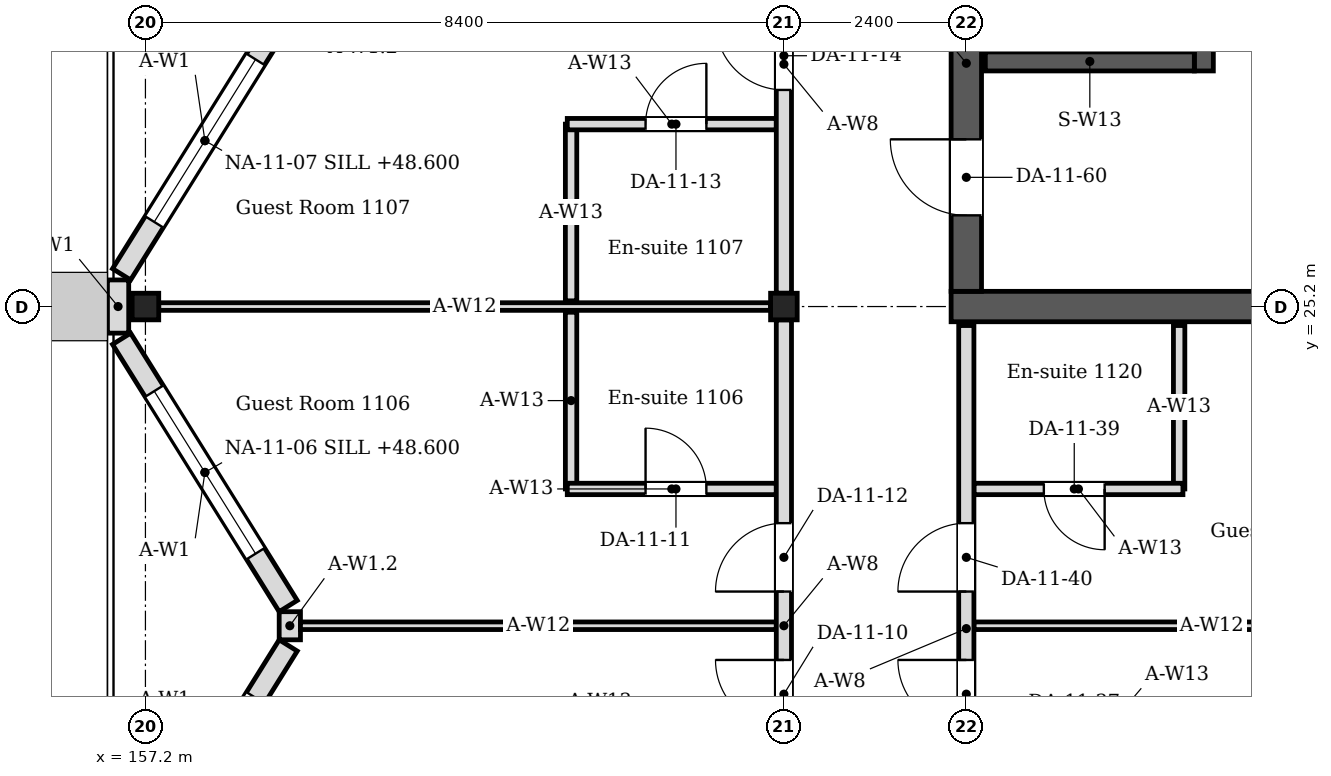
"""IFC4 building model, lengths in metres.
Left out: names, types, materials, properties, quantities, classifications, styles, units other than length and angle.
Written with IfcOpenShell. Run it as: python <this file> out.ifc"""

import sys

from ifc_helpers import new_model, si_unit, direction, frame, frame_2d, origin, origin_2d, place, context, subcontext, project, spatial, rectangle, i_section, extrude, element, fill, save


model = new_model("IFC4")
c1 = context("Model", 3, precision=1e-05, world=origin(), true_north=direction((0.0, 1.0)))
c2 = subcontext(c1, "Body", "Model", "MODEL_VIEW")
j1 = project(units=[si_unit("LENGTHUNIT", "METRE"), si_unit("PLANEANGLEUNIT", "RADIAN")], contexts=[c1])
p1 = place(None, origin())
s1 = spatial("IfcSite", under=j1, at=p1, CompositionType="ELEMENT")
p2 = place(p1, origin())
s2 = spatial("IfcBuilding", under=s1, at=p2, CompositionType="ELEMENT")
p3 = place(p2, frame((0.0, 0.0, 48.0)))
s3 = spatial("IfcBuildingStorey", under=s2, at=p3, CompositionType="ELEMENT", Elevation=48.0)
for number, where, z_axis, x_axis in (
    (1, (157.2, 25.2, 0.0), (0.0, 0.0, 1.0), (1.0, 0.0, 0.0)),
    (2, (165.6, 25.2, 0.0), (0.0, 0.0, 1.0), (1.0, 0.0, 0.0)),
):
    element("IfcColumn", number, at=place(p3, frame(where, z_axis=z_axis, x_axis=x_axis)), inside=s3, PredefinedType="COLUMN", context=c2, shape_type="SweptSolid", body=[
        extrude(i_section(OverallWidth=0.35, OverallDepth=0.35, WebThickness=0.012, FlangeThickness=0.019, FilletRadius=0.013, at=origin_2d()), origin(), (0.0, 0.0, 1.0), 4.2),
    ])
p4 = place(p3, frame((167.8, 25.2, 0.0), z_axis=(0.0, 0.0, 1.0), x_axis=(1.0, 0.0, 0.0)))
e3 = element("IfcWall", 3, at=p4, inside=s3, PredefinedType="SOLIDWALL", context=c2, shape_type="SweptSolid", body=[
    extrude(rectangle(XDim=8.8, YDim=0.4, at=frame_2d((4.4, 0.0))), origin(), (0.0, 0.0, 1.0), 4.05),
])
p5 = place(p3, frame((168.0, 25.4, 0.0), z_axis=(0.0, 0.0, 1.0), x_axis=(0.0, 1.0, 0.0)))
e4 = element("IfcWall", 4, at=p5, inside=s3, PredefinedType="SOLIDWALL", context=c2, shape_type="SweptSolid", body=[
    extrude(rectangle(XDim=16.4, YDim=0.4, at=frame_2d((8.2, 0.0))), origin(), (0.0, 0.0, 1.0), 4.05),
])
p6 = place(p5, frame((1.0, 0.0, 0.0)))
e5 = element("IfcOpeningElement", 5, at=p6, cuts=e4, PredefinedType="OPENING", context=c2, shape_type="SweptSolid", body=[
    extrude(rectangle(XDim=1.0, YDim=2.1, at=frame_2d((0.5, 1.05))), frame((0.0, 0.21, 0.0), z_axis=(0.0, -1.0, 0.0), x_axis=(1.0, 0.0, 0.0)), (0.0, 0.0, 1.0), 0.42),
])
p7 = place(p5, frame((14.4, 0.0, 0.0)))
e6 = element("IfcOpeningElement", 6, at=p7, cuts=e4, PredefinedType="OPENING", context=c2, shape_type="SweptSolid", body=[
    extrude(rectangle(XDim=1.4, YDim=2.1, at=frame_2d((0.7, 1.05))), frame((0.0, 0.21, 0.0), z_axis=(0.0, -1.0, 0.0), x_axis=(1.0, 0.0, 0.0)), (0.0, 0.0, 1.0), 0.42),
])
p8 = place(p3, frame((156.886, 17.224, 0.0), z_axis=(0.0, 0.0, 1.0), x_axis=(0.529018946142, 0.848610013271, 0.0)))
e7 = element("IfcWall", 7, at=p8, inside=s3, PredefinedType="SOLIDWALL", context=c2, shape_type="SweptSolid", body=[
    extrude(rectangle(XDim=4.144, YDim=0.28, at=frame_2d((2.072, 0.0))), origin(), (0.0, 0.0, 1.0), 4.05),
])
p9 = place(p8, frame((0.812, 0.0, 0.6)))
e8 = element("IfcOpeningElement", 8, at=p9, cuts=e7, PredefinedType="OPENING", context=c2, shape_type="SweptSolid", body=[
    extrude(rectangle(XDim=2.52, YDim=2.4, at=frame_2d((1.26, 1.2))), frame((0.0, 0.15, 0.0), z_axis=(0.0, -1.0, 0.0), x_axis=(1.0, 0.0, 0.0)), (0.0, 0.0, 1.0), 0.3),
])
p10 = place(p3, frame((159.079, 21.259, 0.0), z_axis=(0.0, 0.0, 1.0), x_axis=(-0.529018946142, 0.848610013271, 0.0)))
e9 = element("IfcWall", 9, at=p10, inside=s3, PredefinedType="SOLIDWALL", context=c2, shape_type="SweptSolid", body=[
    extrude(rectangle(XDim=4.144, YDim=0.28, at=frame_2d((2.072, 0.0))), origin(), (0.0, 0.0, 1.0), 4.05),
])
p11 = place(p10, frame((0.812, 0.0, 0.6)))
e10 = element("IfcOpeningElement", 10, at=p11, cuts=e9, PredefinedType="OPENING", context=c2, shape_type="SweptSolid", body=[
    extrude(rectangle(XDim=2.52, YDim=2.4, at=frame_2d((1.26, 1.2))), frame((0.0, 0.15, 0.0), z_axis=(0.0, -1.0, 0.0), x_axis=(1.0, 0.0, 0.0)), (0.0, 0.0, 1.0), 0.3),
])
p12 = place(p3, frame((159.1, 20.815, 0.0), z_axis=(0.0, 0.0, 1.0), x_axis=(0.0, 1.0, 0.0)))
e11 = element("IfcWall", 11, at=p12, inside=s3, PredefinedType="SOLIDWALL", context=c2, shape_type="SweptSolid", body=[
    extrude(rectangle(XDim=0.37, YDim=0.28, at=frame_2d((0.185, 0.0))), origin(), (0.0, 0.0, 1.0), 3.604),
])
p13 = place(p3, frame((156.84, 24.85, 0.0), z_axis=(0.0, 0.0, 1.0), x_axis=(0.0, 1.0, 0.0)))
e12 = element("IfcWall", 12, at=p13, inside=s3, PredefinedType="SOLIDWALL", context=c2, shape_type="SweptSolid", body=[
    extrude(rectangle(XDim=0.7, YDim=0.28, at=frame_2d((0.35, 0.0))), origin(), (0.0, 0.0, 1.0), 4.05),
])
p14 = place(p3, frame((156.886, 25.624, 0.0), z_axis=(0.0, 0.0, 1.0), x_axis=(0.528992500338, 0.848626498871, 0.0)))
e13 = element("IfcWall", 13, at=p14, inside=s3, PredefinedType="SOLIDWALL", context=c2, shape_type="SweptSolid", body=[
    extrude(rectangle(XDim=4.145, YDim=0.28, at=frame_2d((2.072, 0.0))), origin(), (0.0, 0.0, 1.0), 4.05),
])
p15 = place(p14, frame((0.812, 0.0, 0.6)))
e14 = element("IfcOpeningElement", 14, at=p15, cuts=e13, PredefinedType="OPENING", context=c2, shape_type="SweptSolid", body=[
    extrude(rectangle(XDim=2.52, YDim=2.4, at=frame_2d((1.26, 1.2))), frame((0.0, 0.15, 0.0), z_axis=(0.0, -1.0, 0.0), x_axis=(1.0, 0.0, 0.0)), (0.0, 0.0, 1.0), 0.3),
])
p16 = place(p3, frame((162.8, 22.8, 0.0), z_axis=(0.0, 0.0, 1.0), x_axis=(0.0, 1.0, 0.0)))
e15 = element("IfcWall", 15, at=p16, inside=s3, PredefinedType="PARTITIONING", context=c2, shape_type="SweptSolid", body=[
    extrude(rectangle(XDim=2.325, YDim=0.15, at=frame_2d((1.163, 0.0))), origin(), (0.0, 0.0, 1.0), 4.05),
])
p17 = place(p3, frame((162.75, 22.8, 0.0), z_axis=(0.0, 0.0, 1.0), x_axis=(1.0, 0.0, 0.0)))
e16 = element("IfcWall", 16, at=p17, inside=s3, PredefinedType="PARTITIONING", context=c2, shape_type="SweptSolid", body=[
    extrude(rectangle(XDim=2.75, YDim=0.15, at=frame_2d((1.375, 0.0))), origin(), (0.0, 0.0, 1.0), 4.05),
])
p18 = place(p17, frame((1.03, 0.0, 0.0)))
e17 = element("IfcOpeningElement", 17, at=p18, cuts=e16, PredefinedType="OPENING", context=c2, shape_type="SweptSolid", body=[
    extrude(rectangle(XDim=0.8, YDim=2.1, at=frame_2d((0.4, 1.05))), frame((0.0, 0.085, 0.0), z_axis=(0.0, -1.0, 0.0), x_axis=(1.0, 0.0, 0.0)), (0.0, 0.0, 1.0), 0.17),
])
p19 = place(p3, frame((162.8, 25.275, 0.0), z_axis=(0.0, 0.0, 1.0), x_axis=(0.0, 1.0, 0.0)))
e18 = element("IfcWall", 18, at=p19, inside=s3, PredefinedType="PARTITIONING", context=c2, shape_type="SweptSolid", body=[
    extrude(rectangle(XDim=2.325, YDim=0.15, at=frame_2d((1.163, 0.0))), origin(), (0.0, 0.0, 1.0), 4.05),
])
p20 = place(p3, frame((162.75, 27.6, 0.0), z_axis=(0.0, 0.0, 1.0), x_axis=(1.0, 0.0, 0.0)))
e19 = element("IfcWall", 19, at=p20, inside=s3, PredefinedType="PARTITIONING", context=c2, shape_type="SweptSolid", body=[
    extrude(rectangle(XDim=2.75, YDim=0.15, at=frame_2d((1.375, 0.0))), origin(), (0.0, 0.0, 1.0), 4.05),
])
p21 = place(p20, frame((1.03, 0.0, 0.0)))
e20 = element("IfcOpeningElement", 20, at=p21, cuts=e19, PredefinedType="OPENING", context=c2, shape_type="SweptSolid", body=[
    extrude(rectangle(XDim=0.8, YDim=2.1, at=frame_2d((0.4, 1.05))), frame((0.0, 0.085, 0.0), z_axis=(0.0, -1.0, 0.0), x_axis=(1.0, 0.0, 0.0)), (0.0, 0.0, 1.0), 0.17),
])
p22 = place(p3, frame((170.8, 22.8, 0.0), z_axis=(0.0, 0.0, 1.0), x_axis=(0.0, 1.0, 0.0)))
e21 = element("IfcWall", 21, at=p22, inside=s3, PredefinedType="PARTITIONING", context=c2, shape_type="SweptSolid", body=[
    extrude(rectangle(XDim=2.15, YDim=0.15, at=frame_2d((1.075, 0.0))), origin(), (0.0, 0.0, 1.0), 4.05),
])
p23 = place(p3, frame((170.85, 22.8, 0.0), z_axis=(0.0, 0.0, 1.0), x_axis=(-1.0, 0.0, 0.0)))
e22 = element("IfcWall", 22, at=p23, inside=s3, PredefinedType="PARTITIONING", context=c2, shape_type="SweptSolid", body=[
    extrude(rectangle(XDim=2.75, YDim=0.15, at=frame_2d((1.375, 0.0))), origin(), (0.0, 0.0, 1.0), 4.05),
])
p24 = place(p23, frame((1.03, 0.0, 0.0)))
e23 = element("IfcOpeningElement", 23, at=p24, cuts=e22, PredefinedType="OPENING", context=c2, shape_type="SweptSolid", body=[
    extrude(rectangle(XDim=0.8, YDim=2.1, at=frame_2d((0.4, 1.05))), frame((0.0, 0.085, 0.0), z_axis=(0.0, -1.0, 0.0), x_axis=(1.0, 0.0, 0.0)), (0.0, 0.0, 1.0), 0.17),
])
p25 = place(p3, frame((157.375, 25.2, 0.0), z_axis=(0.0, 0.0, 1.0), x_axis=(1.0, 0.0, 0.0)))
e24 = element("IfcWall", 24, at=p25, inside=s3, PredefinedType="PARTITIONING", context=c2, shape_type="SweptSolid", body=[
    extrude(rectangle(XDim=8.05, YDim=0.1, at=frame_2d((4.025, 0.0))), origin(), (0.0, 0.0, 1.0), 3.604),
])
for number, where, z_axis, x_axis in (
    (25, (159.24, 21.0, 0.0), (0.0, 0.0, 1.0), (1.0, 0.0, 0.0)),
    (26, (168.1, 21.0, 0.0), (0.0, 0.0, 1.0), (1.0, 0.0, 0.0)),
):
    element("IfcWall", number, at=place(p3, frame(where, z_axis=z_axis, x_axis=x_axis)), inside=s3, PredefinedType="PARTITIONING", context=c2, shape_type="SweptSolid", body=[
        extrude(rectangle(XDim=6.26, YDim=0.1, at=frame_2d((3.13, 0.0))), origin(), (0.0, 0.0, 1.0), 3.604),
    ])
p26 = place(p3, frame((165.6, 16.975, 0.0), z_axis=(0.0, 0.0, 1.0), x_axis=(0.0, 1.0, 0.0)))
e27 = element("IfcWall", 27, at=p26, inside=s3, PredefinedType="PARTITIONING", context=c2, shape_type="SweptSolid", body=[
    extrude(rectangle(XDim=8.05, YDim=0.2, at=frame_2d((4.025, 0.0))), origin(), (0.0, 0.0, 1.0), 3.45),
])
p27 = place(p26, frame((2.675, 0.0, 0.0)))
e28 = element("IfcOpeningElement", 28, at=p27, cuts=e27, PredefinedType="OPENING", context=c2, shape_type="SweptSolid", body=[
    extrude(rectangle(XDim=0.9, YDim=2.1, at=frame_2d((0.45, 1.05))), frame((0.0, 0.11, 0.0), z_axis=(0.0, -1.0, 0.0), x_axis=(1.0, 0.0, 0.0)), (0.0, 0.0, 1.0), 0.22),
])
p28 = place(p26, frame((4.475, 0.0, 0.0)))
e29 = element("IfcOpeningElement", 29, at=p28, cuts=e27, PredefinedType="OPENING", context=c2, shape_type="SweptSolid", body=[
    extrude(rectangle(XDim=0.9, YDim=2.1, at=frame_2d((0.45, 1.05))), frame((0.0, 0.11, 0.0), z_axis=(0.0, -1.0, 0.0), x_axis=(1.0, 0.0, 0.0)), (0.0, 0.0, 1.0), 0.22),
])
p29 = place(p3, frame((165.6, 25.375, 0.0), z_axis=(0.0, 0.0, 1.0), x_axis=(0.0, 1.0, 0.0)))
e30 = element("IfcWall", 30, at=p29, inside=s3, PredefinedType="PARTITIONING", context=c2, shape_type="SweptSolid", body=[
    extrude(rectangle(XDim=8.05, YDim=0.2, at=frame_2d((4.025, 0.0))), origin(), (0.0, 0.0, 1.0), 3.45),
])
p30 = place(p29, frame((2.675, 0.0, 0.0)))
e31 = element("IfcOpeningElement", 31, at=p30, cuts=e30, PredefinedType="OPENING", context=c2, shape_type="SweptSolid", body=[
    extrude(rectangle(XDim=0.9, YDim=2.1, at=frame_2d((0.45, 1.05))), frame((0.0, 0.11, 0.0), z_axis=(0.0, -1.0, 0.0), x_axis=(1.0, 0.0, 0.0)), (0.0, 0.0, 1.0), 0.22),
])
p31 = place(p29, frame((4.475, 0.0, 0.0)))
e32 = element("IfcOpeningElement", 32, at=p31, cuts=e30, PredefinedType="OPENING", context=c2, shape_type="SweptSolid", body=[
    extrude(rectangle(XDim=0.9, YDim=2.1, at=frame_2d((0.45, 1.05))), frame((0.0, 0.11, 0.0), z_axis=(0.0, -1.0, 0.0), x_axis=(1.0, 0.0, 0.0)), (0.0, 0.0, 1.0), 0.22),
])
p32 = place(p3, frame((168.0, 16.975, 0.0), z_axis=(0.0, 0.0, 1.0), x_axis=(0.0, 1.0, 0.0)))
e33 = element("IfcWall", 33, at=p32, inside=s3, PredefinedType="PARTITIONING", context=c2, shape_type="SweptSolid", body=[
    extrude(rectangle(XDim=7.975, YDim=0.2, at=frame_2d((3.987, 0.0))), origin(), (0.0, 0.0, 1.0), 3.45),
])
p33 = place(p32, frame((2.675, 0.0, 0.0)))
e34 = element("IfcOpeningElement", 34, at=p33, cuts=e33, PredefinedType="OPENING", context=c2, shape_type="SweptSolid", body=[
    extrude(rectangle(XDim=0.9, YDim=2.1, at=frame_2d((0.45, 1.05))), frame((0.0, 0.11, 0.0), z_axis=(0.0, -1.0, 0.0), x_axis=(1.0, 0.0, 0.0)), (0.0, 0.0, 1.0), 0.22),
])
p34 = place(p32, frame((4.475, 0.0, 0.0)))
e35 = element("IfcOpeningElement", 35, at=p34, cuts=e33, PredefinedType="OPENING", context=c2, shape_type="SweptSolid", body=[
    extrude(rectangle(XDim=0.9, YDim=2.1, at=frame_2d((0.45, 1.05))), frame((0.0, 0.11, 0.0), z_axis=(0.0, -1.0, 0.0), x_axis=(1.0, 0.0, 0.0)), (0.0, 0.0, 1.0), 0.22),
])
p35 = place(p3, frame((171.125, 28.3, 0.0), z_axis=(0.0, 0.0, 1.0), x_axis=(0.0, 1.0, 0.0)))
e36 = element("IfcWall", 36, at=p35, inside=s3, PredefinedType="SOLIDWALL", context=c2, shape_type="SweptSolid", body=[
    extrude(rectangle(XDim=10.9, YDim=0.25, at=frame_2d((5.45, 0.0))), origin(), (0.0, 0.0, 1.0), 4.05),
])
p36 = place(p35, frame((0.8, 0.0, 0.0)))
e37 = element("IfcOpeningElement", 37, at=p36, cuts=e36, PredefinedType="OPENING", context=c2, shape_type="SweptSolid", body=[
    extrude(rectangle(XDim=1.1, YDim=2.1, at=frame_2d((0.55, 1.05))), frame((0.0, 0.135, 0.0), z_axis=(0.0, -1.0, 0.0), x_axis=(1.0, 0.0, 0.0)), (0.0, 0.0, 1.0), 0.27),
])
p37 = place(p35, frame((3.05, 0.0, 0.0)))
e38 = element("IfcOpeningElement", 38, at=p37, cuts=e36, PredefinedType="OPENING", context=c2, shape_type="SweptSolid", body=[
    extrude(rectangle(XDim=1.1, YDim=2.1, at=frame_2d((0.55, 1.05))), frame((0.0, 0.135, 0.0), z_axis=(0.0, -1.0, 0.0), x_axis=(1.0, 0.0, 0.0)), (0.0, 0.0, 1.0), 0.27),
])
p38 = place(p35, frame((5.1, 0.0, 0.0)))
e39 = element("IfcOpeningElement", 39, at=p38, cuts=e36, PredefinedType="OPENING", context=c2, shape_type="SweptSolid", body=[
    extrude(rectangle(XDim=1.1, YDim=2.1, at=frame_2d((0.55, 1.05))), frame((0.0, 0.135, 0.0), z_axis=(0.0, -1.0, 0.0), x_axis=(1.0, 0.0, 0.0)), (0.0, 0.0, 1.0), 0.27),
])
p39 = place(p35, frame((7.15, 0.0, 0.0)))
e40 = element("IfcOpeningElement", 40, at=p39, cuts=e36, PredefinedType="OPENING", context=c2, shape_type="SweptSolid", body=[
    extrude(rectangle(XDim=1.1, YDim=2.1, at=frame_2d((0.55, 1.05))), frame((0.0, 0.135, 0.0), z_axis=(0.0, -1.0, 0.0), x_axis=(1.0, 0.0, 0.0)), (0.0, 0.0, 1.0), 0.27),
])
p40 = place(p35, frame((9.2, 0.0, 0.0)))
e41 = element("IfcOpeningElement", 41, at=p40, cuts=e36, PredefinedType="OPENING", context=c2, shape_type="SweptSolid", body=[
    extrude(rectangle(XDim=1.1, YDim=2.1, at=frame_2d((0.55, 1.05))), frame((0.0, 0.135, 0.0), z_axis=(0.0, -1.0, 0.0), x_axis=(1.0, 0.0, 0.0)), (0.0, 0.0, 1.0), 0.27),
])
p41 = place(p3, frame((168.25, 28.425, 0.0), z_axis=(0.0, 0.0, 1.0), x_axis=(1.0, 0.0, 0.0)))
e42 = element("IfcWall", 42, at=p41, inside=s3, PredefinedType="SOLIDWALL", context=c2, shape_type="SweptSolid", body=[
    extrude(rectangle(XDim=2.75, YDim=0.25, at=frame_2d((1.375, 0.0))), origin(), (0.0, 0.0, 1.0), 4.05),
])
p42 = place(p11, origin())
e43 = element("IfcWindow", 43, at=p42, inside=s3, PartitioningType="SINGLE_PANEL", PredefinedType="WINDOW", context=c2, shape_type="SweptSolid", body=[
    extrude(rectangle(XDim=2.52, YDim=2.4, at=frame_2d((1.26, 1.2))), frame((0.0, 0.03, 0.0), z_axis=(0.0, -1.0, 0.0), x_axis=(1.0, 0.0, 0.0)), (0.0, 0.0, 1.0), 0.06),
])
fill(e10, e43)
p43 = place(p15, origin())
e44 = element("IfcWindow", 44, at=p43, inside=s3, PartitioningType="SINGLE_PANEL", PredefinedType="WINDOW", context=c2, shape_type="SweptSolid", body=[
    extrude(rectangle(XDim=2.52, YDim=2.4, at=frame_2d((1.26, 1.2))), frame((0.0, 0.03, 0.0), z_axis=(0.0, -1.0, 0.0), x_axis=(1.0, 0.0, 0.0)), (0.0, 0.0, 1.0), 0.06),
])
fill(e14, e44)
p44 = place(p27, origin())
e45 = element("IfcDoor", 45, at=p44, inside=s3, OperationType="SINGLE_SWING_RIGHT", PredefinedType="DOOR", context=c2, shape_type="SweptSolid", body=[
    extrude(rectangle(XDim=0.9, YDim=2.1, at=frame_2d((0.45, 1.05))), frame((0.0, 0.025, 0.0), z_axis=(0.0, -1.0, 0.0), x_axis=(1.0, 0.0, 0.0)), (0.0, 0.0, 1.0), 0.05),
])
fill(e28, e45)
p45 = place(p18, origin())
e46 = element("IfcDoor", 46, at=p45, inside=s3, OperationType="SINGLE_SWING_LEFT", PredefinedType="DOOR", context=c2, shape_type="SweptSolid", body=[
    extrude(rectangle(XDim=0.8, YDim=2.1, at=frame_2d((0.4, 1.05))), frame((0.0, 0.025, 0.0), z_axis=(0.0, -1.0, 0.0), x_axis=(1.0, 0.0, 0.0)), (0.0, 0.0, 1.0), 0.05),
])
fill(e17, e46)
p46 = place(p28, origin())
e47 = element("IfcDoor", 47, at=p46, inside=s3, OperationType="SINGLE_SWING_LEFT", PredefinedType="DOOR", context=c2, shape_type="SweptSolid", body=[
    extrude(rectangle(XDim=0.9, YDim=2.1, at=frame_2d((0.45, 1.05))), frame((0.0, 0.025, 0.0), z_axis=(0.0, -1.0, 0.0), x_axis=(1.0, 0.0, 0.0)), (0.0, 0.0, 1.0), 0.05),
])
fill(e29, e47)
p47 = place(p21, origin())
e48 = element("IfcDoor", 48, at=p47, inside=s3, OperationType="SINGLE_SWING_RIGHT", PredefinedType="DOOR", context=c2, shape_type="SweptSolid", body=[
    extrude(rectangle(XDim=0.8, YDim=2.1, at=frame_2d((0.4, 1.05))), frame((0.0, 0.025, 0.0), z_axis=(0.0, -1.0, 0.0), x_axis=(1.0, 0.0, 0.0)), (0.0, 0.0, 1.0), 0.05),
])
fill(e20, e48)
p48 = place(p30, origin())
e49 = element("IfcDoor", 49, at=p48, inside=s3, OperationType="SINGLE_SWING_RIGHT", PredefinedType="DOOR", context=c2, shape_type="SweptSolid", body=[
    extrude(rectangle(XDim=0.9, YDim=2.1, at=frame_2d((0.45, 1.05))), frame((0.0, 0.025, 0.0), z_axis=(0.0, -1.0, 0.0), x_axis=(1.0, 0.0, 0.0)), (0.0, 0.0, 1.0), 0.05),
])
fill(e31, e49)
p49 = place(p33, origin())
e50 = element("IfcDoor", 50, at=p49, inside=s3, OperationType="SINGLE_SWING_RIGHT", PredefinedType="DOOR", context=c2, shape_type="SweptSolid", body=[
    extrude(rectangle(XDim=0.9, YDim=2.1, at=frame_2d((0.45, 1.05))), frame((0.0, 0.025, 0.0), z_axis=(0.0, -1.0, 0.0), x_axis=(1.0, 0.0, 0.0)), (0.0, 0.0, 1.0), 0.05),
])
fill(e34, e50)
p50 = place(p24, origin())
e51 = element("IfcDoor", 51, at=p50, inside=s3, OperationType="SINGLE_SWING_LEFT", PredefinedType="DOOR", context=c2, shape_type="SweptSolid", body=[
    extrude(rectangle(XDim=0.8, YDim=2.1, at=frame_2d((0.4, 1.05))), frame((0.0, 0.025, 0.0), z_axis=(0.0, -1.0, 0.0), x_axis=(1.0, 0.0, 0.0)), (0.0, 0.0, 1.0), 0.05),
])
fill(e23, e51)
p51 = place(p34, origin())
e52 = element("IfcDoor", 52, at=p51, inside=s3, OperationType="SINGLE_SWING_LEFT", PredefinedType="DOOR", context=c2, shape_type="SweptSolid", body=[
    extrude(rectangle(XDim=0.9, YDim=2.1, at=frame_2d((0.45, 1.05))), frame((0.0, 0.025, 0.0), z_axis=(0.0, -1.0, 0.0), x_axis=(1.0, 0.0, 0.0)), (0.0, 0.0, 1.0), 0.05),
])
fill(e35, e52)
p52 = place(p6, origin())
e53 = element("IfcDoor", 53, at=p52, inside=s3, OperationType="SINGLE_SWING_RIGHT", PredefinedType="DOOR", context=c2, shape_type="SweptSolid", body=[
    extrude(rectangle(XDim=1.0, YDim=2.1, at=frame_2d((0.5, 1.05))), frame((0.0, 0.025, 0.0), z_axis=(0.0, -1.0, 0.0), x_axis=(1.0, 0.0, 0.0)), (0.0, 0.0, 1.0), 0.05),
])
fill(e5, e53)
save(model, sys.argv[1])
